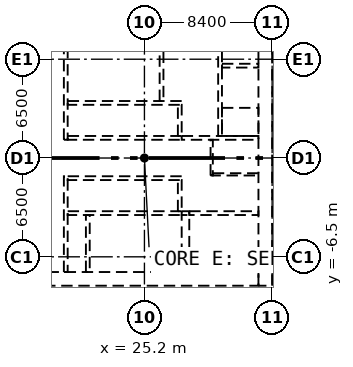
"""IFC4 building model, lengths in metres.
Left out: names, types, materials, properties, quantities, classifications, styles, units other than length and angle.
Written with IfcOpenShell. Run it as: python <this file> out.ifc"""

import sys

from ifc_helpers import new_model, si_unit, direction, frame, frame_2d, origin, place, context, subcontext, project, spatial, rectangle, extrude, element, fill, save


model = new_model("IFC4")
c1 = context("Model", 3, precision=1e-05, world=origin(), true_north=direction((0.0, 1.0)))
c2 = subcontext(c1, "Body", "Model", "MODEL_VIEW")
j1 = project(units=[si_unit("LENGTHUNIT", "METRE"), si_unit("PLANEANGLEUNIT", "RADIAN")], contexts=[c1])
p1 = place(None, origin())
s1 = spatial("IfcSite", under=j1, at=p1, CompositionType="ELEMENT")
p2 = place(p1, origin())
s2 = spatial("IfcBuilding", under=s1, at=p2, CompositionType="ELEMENT")
p3 = place(p2, origin())
s3 = spatial("IfcBuildingStorey", under=s2, at=p3, CompositionType="ELEMENT", Elevation=0.0)
p4 = place(p3, frame((33.15, -8.4, 0.0), z_axis=(0.0, 0.0, 1.0), x_axis=(0.0, 1.0, 0.0)))
e1 = element("IfcWall", 1, at=p4, inside=s3, PredefinedType="SHEAR", context=c2, shape_type="SweptSolid", body=[
    extrude(rectangle(XDim=16.8, YDim=0.9, at=frame_2d((8.4, 0.0))), origin(), (0.0, 0.0, 1.0), 8.6),
])
p5 = place(p3, frame((17.7, -7.95, 0.0), z_axis=(0.0, 0.0, 1.0), x_axis=(1.0, 0.0, 0.0)))
e2 = element("IfcWall", 2, at=p5, inside=s3, PredefinedType="SHEAR", context=c2, shape_type="SweptSolid", body=[
    extrude(rectangle(XDim=15.0, YDim=0.9, at=frame_2d((7.5, 0.0))), origin(), (0.0, 0.0, 1.0), 8.6),
])
p6 = place(p5, frame((2.55, 0.0, 0.0)))
e3 = element("IfcOpeningElement", 3, at=p6, cuts=e2, PredefinedType="OPENING", context=c2, shape_type="SweptSolid", body=[
    extrude(rectangle(XDim=1.0, YDim=2.1, at=frame_2d((0.5, 1.05))), frame((0.0, 0.46, 0.0), z_axis=(0.0, -1.0, 0.0), x_axis=(1.0, 0.0, 0.0)), (0.0, 0.0, 1.0), 0.92),
])
p7 = place(p5, frame((4.2, 0.0, 0.0)))
e4 = element("IfcOpeningElement", 4, at=p7, cuts=e2, PredefinedType="OPENING", context=c2, shape_type="SweptSolid", body=[
    extrude(rectangle(XDim=1.2, YDim=2.1, at=frame_2d((0.6, 1.05))), frame((0.0, 0.46, 0.0), z_axis=(0.0, -1.0, 0.0), x_axis=(1.0, 0.0, 0.0)), (0.0, 0.0, 1.0), 0.92),
])
p8 = place(p3, frame((20.025, 1.2, 0.0), z_axis=(0.0, 0.0, 1.0), x_axis=(0.0, 1.0, 0.0)))
e5 = element("IfcWall", 5, at=p8, inside=s3, PredefinedType="SHEAR", context=c2, shape_type="SweptSolid", body=[
    extrude(rectangle(XDim=6.3, YDim=0.25, at=frame_2d((3.15, 0.0))), origin(), (0.0, 0.0, 1.0), 8.6),
])
p9 = place(p3, frame((20.025, -7.5, 0.0), z_axis=(0.0, 0.0, 1.0), x_axis=(0.0, 1.0, 0.0)))
e6 = element("IfcWall", 6, at=p9, inside=s3, PredefinedType="SHEAR", context=c2, shape_type="SweptSolid", body=[
    extrude(rectangle(XDim=6.3, YDim=0.25, at=frame_2d((3.15, 0.0))), origin(), (0.0, 0.0, 1.0), 8.6),
])
p10 = place(p9, frame((2.4, 0.0, 0.0)))
e7 = element("IfcOpeningElement", 7, at=p10, cuts=e6, PredefinedType="OPENING", context=c2, shape_type="SweptSolid", body=[
    extrude(rectangle(XDim=1.0, YDim=2.1, at=frame_2d((0.5, 1.05))), frame((0.0, 0.135, 0.0), z_axis=(0.0, -1.0, 0.0), x_axis=(1.0, 0.0, 0.0)), (0.0, 0.0, 1.0), 0.27),
])
p11 = place(p3, frame((20.15, 1.325, 0.0), z_axis=(0.0, 0.0, 1.0), x_axis=(1.0, 0.0, 0.0)))
e8 = element("IfcWall", 8, at=p11, inside=s3, PredefinedType="SHEAR", context=c2, shape_type="SweptSolid", body=[
    extrude(rectangle(XDim=7.5, YDim=0.25, at=frame_2d((3.75, 0.0))), origin(), (0.0, 0.0, 1.0), 8.6),
])
p12 = place(p11, frame((0.65, 0.0, 0.0)))
e9 = element("IfcOpeningElement", 9, at=p12, cuts=e8, PredefinedType="OPENING", context=c2, shape_type="SweptSolid", body=[
    extrude(rectangle(XDim=1.1, YDim=2.1, at=frame_2d((0.55, 1.05))), frame((0.0, 0.135, 0.0), z_axis=(0.0, -1.0, 0.0), x_axis=(1.0, 0.0, 0.0)), (0.0, 0.0, 1.0), 0.27),
])
p13 = place(p11, frame((3.05, 0.0, 0.0)))
e10 = element("IfcOpeningElement", 10, at=p13, cuts=e8, PredefinedType="OPENING", context=c2, shape_type="SweptSolid", body=[
    extrude(rectangle(XDim=1.1, YDim=2.1, at=frame_2d((0.55, 1.05))), frame((0.0, 0.135, 0.0), z_axis=(0.0, -1.0, 0.0), x_axis=(1.0, 0.0, 0.0)), (0.0, 0.0, 1.0), 0.27),
])
p14 = place(p11, frame((5.45, 0.0, 0.0)))
e11 = element("IfcOpeningElement", 11, at=p14, cuts=e8, PredefinedType="OPENING", context=c2, shape_type="SweptSolid", body=[
    extrude(rectangle(XDim=1.1, YDim=2.1, at=frame_2d((0.55, 1.05))), frame((0.0, 0.135, 0.0), z_axis=(0.0, -1.0, 0.0), x_axis=(1.0, 0.0, 0.0)), (0.0, 0.0, 1.0), 0.27),
])
p15 = place(p3, frame((27.525, 1.45, 0.0), z_axis=(0.0, 0.0, 1.0), x_axis=(0.0, 1.0, 0.0)))
e12 = element("IfcWall", 12, at=p15, inside=s3, PredefinedType="SHEAR", context=c2, shape_type="SweptSolid", body=[
    extrude(rectangle(XDim=2.05, YDim=0.25, at=frame_2d((1.025, 0.0))), origin(), (0.0, 0.0, 1.0), 8.6),
])
p16 = place(p3, frame((20.15, 3.625, 0.0), z_axis=(0.0, 0.0, 1.0), x_axis=(1.0, 0.0, 0.0)))
e13 = element("IfcWall", 13, at=p16, inside=s3, PredefinedType="SHEAR", context=c2, shape_type="SweptSolid", body=[
    extrude(rectangle(XDim=7.5, YDim=0.25, at=frame_2d((3.75, 0.0))), origin(), (0.0, 0.0, 1.0), 8.6),
])
p17 = place(p3, frame((26.325, 3.75, 0.0), z_axis=(0.0, 0.0, 1.0), x_axis=(0.0, 1.0, 0.0)))
e14 = element("IfcWall", 14, at=p17, inside=s3, PredefinedType="SHEAR", context=c2, shape_type="SweptSolid", body=[
    extrude(rectangle(XDim=3.75, YDim=0.25, at=frame_2d((1.875, 0.0))), origin(), (0.0, 0.0, 1.0), 8.6),
])
p18 = place(p17, frame((1.25, 0.0, 0.0)))
e15 = element("IfcOpeningElement", 15, at=p18, cuts=e14, PredefinedType="OPENING", context=c2, shape_type="SweptSolid", body=[
    extrude(rectangle(XDim=1.2, YDim=2.1, at=frame_2d((0.6, 1.05))), frame((0.0, 0.135, 0.0), z_axis=(0.0, -1.0, 0.0), x_axis=(1.0, 0.0, 0.0)), (0.0, 0.0, 1.0), 0.27),
])
p19 = place(p3, frame((27.65, 1.325, 0.0), z_axis=(0.0, 0.0, 1.0), x_axis=(1.0, 0.0, 0.0)))
e16 = element("IfcWall", 16, at=p19, inside=s3, PredefinedType="SHEAR", context=c2, shape_type="SweptSolid", body=[
    extrude(rectangle(XDim=5.05, YDim=0.25, at=frame_2d((2.525, 0.0))), origin(), (0.0, 0.0, 1.0), 8.6),
])
p20 = place(p19, frame((0.55, 0.0, 0.0)))
e17 = element("IfcOpeningElement", 17, at=p20, cuts=e16, PredefinedType="OPENING", context=c2, shape_type="SweptSolid", body=[
    extrude(rectangle(XDim=1.2, YDim=2.1, at=frame_2d((0.6, 1.05))), frame((0.0, 0.135, 0.0), z_axis=(0.0, -1.0, 0.0), x_axis=(1.0, 0.0, 0.0)), (0.0, 0.0, 1.0), 0.27),
])
p21 = place(p3, frame((30.175, 1.45, 0.0), z_axis=(0.0, 0.0, 1.0), x_axis=(0.0, 1.0, 0.0)))
e18 = element("IfcWall", 18, at=p21, inside=s3, PredefinedType="SHEAR", context=c2, shape_type="SweptSolid", body=[
    extrude(rectangle(XDim=6.05, YDim=0.25, at=frame_2d((3.025, 0.0))), origin(), (0.0, 0.0, 1.0), 8.6),
])
p22 = place(p21, frame((2.625, 0.0, 0.0)))
e19 = element("IfcOpeningElement", 19, at=p22, cuts=e18, PredefinedType="OPENING", context=c2, shape_type="SweptSolid", body=[
    extrude(rectangle(XDim=1.1, YDim=2.1, at=frame_2d((0.55, 1.05))), frame((0.0, 0.135, 0.0), z_axis=(0.0, -1.0, 0.0), x_axis=(1.0, 0.0, 0.0)), (0.0, 0.0, 1.0), 0.27),
])
p23 = place(p3, frame((30.3, 2.375, 0.0), z_axis=(0.0, 0.0, 1.0), x_axis=(1.0, 0.0, 0.0)))
e20 = element("IfcWall", 20, at=p23, inside=s3, PredefinedType="SHEAR", context=c2, shape_type="SweptSolid", body=[
    extrude(rectangle(XDim=2.4, YDim=1.85, at=frame_2d((1.2, 0.0))), origin(), (0.0, 0.0, 1.0), 8.6),
])
p24 = place(p3, frame((30.3, 6.075, 0.0), z_axis=(0.0, 0.0, 1.0), x_axis=(1.0, 0.0, 0.0)))
e21 = element("IfcWall", 21, at=p24, inside=s3, PredefinedType="SHEAR", context=c2, shape_type="SweptSolid", body=[
    extrude(rectangle(XDim=2.4, YDim=0.25, at=frame_2d((1.2, 0.0))), origin(), (0.0, 0.0, 1.0), 8.6),
])
p25 = place(p3, frame((20.15, -1.325, 0.0), z_axis=(0.0, 0.0, 1.0), x_axis=(1.0, 0.0, 0.0)))
e22 = element("IfcWall", 22, at=p25, inside=s3, PredefinedType="SHEAR", context=c2, shape_type="SweptSolid", body=[
    extrude(rectangle(XDim=7.5, YDim=0.25, at=frame_2d((3.75, 0.0))), origin(), (0.0, 0.0, 1.0), 8.6),
])
p26 = place(p25, frame((0.65, 0.0, 0.0)))
e23 = element("IfcOpeningElement", 23, at=p26, cuts=e22, PredefinedType="OPENING", context=c2, shape_type="SweptSolid", body=[
    extrude(rectangle(XDim=1.1, YDim=2.1, at=frame_2d((0.55, 1.05))), frame((0.0, 0.135, 0.0), z_axis=(0.0, -1.0, 0.0), x_axis=(1.0, 0.0, 0.0)), (0.0, 0.0, 1.0), 0.27),
])
p27 = place(p25, frame((3.05, 0.0, 0.0)))
e24 = element("IfcOpeningElement", 24, at=p27, cuts=e22, PredefinedType="OPENING", context=c2, shape_type="SweptSolid", body=[
    extrude(rectangle(XDim=1.1, YDim=2.1, at=frame_2d((0.55, 1.05))), frame((0.0, 0.135, 0.0), z_axis=(0.0, -1.0, 0.0), x_axis=(1.0, 0.0, 0.0)), (0.0, 0.0, 1.0), 0.27),
])
p28 = place(p25, frame((5.45, 0.0, 0.0)))
e25 = element("IfcOpeningElement", 25, at=p28, cuts=e22, PredefinedType="OPENING", context=c2, shape_type="SweptSolid", body=[
    extrude(rectangle(XDim=1.1, YDim=2.1, at=frame_2d((0.55, 1.05))), frame((0.0, 0.135, 0.0), z_axis=(0.0, -1.0, 0.0), x_axis=(1.0, 0.0, 0.0)), (0.0, 0.0, 1.0), 0.27),
])
p29 = place(p3, frame((27.525, -3.5, 0.0), z_axis=(0.0, 0.0, 1.0), x_axis=(0.0, 1.0, 0.0)))
e26 = element("IfcWall", 26, at=p29, inside=s3, PredefinedType="SHEAR", context=c2, shape_type="SweptSolid", body=[
    extrude(rectangle(XDim=2.05, YDim=0.25, at=frame_2d((1.025, 0.0))), origin(), (0.0, 0.0, 1.0), 8.6),
])
p30 = place(p3, frame((20.15, -3.625, 0.0), z_axis=(0.0, 0.0, 1.0), x_axis=(1.0, 0.0, 0.0)))
e27 = element("IfcWall", 27, at=p30, inside=s3, PredefinedType="SHEAR", context=c2, shape_type="SweptSolid", body=[
    extrude(rectangle(XDim=7.5, YDim=0.25, at=frame_2d((3.75, 0.0))), origin(), (0.0, 0.0, 1.0), 8.6),
])
p31 = place(p3, frame((21.475, -7.5, 0.0), z_axis=(0.0, 0.0, 1.0), x_axis=(0.0, 1.0, 0.0)))
e28 = element("IfcWall", 28, at=p31, inside=s3, PredefinedType="SHEAR", context=c2, shape_type="SweptSolid", body=[
    extrude(rectangle(XDim=3.75, YDim=0.25, at=frame_2d((1.875, 0.0))), origin(), (0.0, 0.0, 1.0), 8.6),
])
p32 = place(p31, frame((1.3, 0.0, 0.0)))
e29 = element("IfcOpeningElement", 29, at=p32, cuts=e28, PredefinedType="OPENING", context=c2, shape_type="SweptSolid", body=[
    extrude(rectangle(XDim=1.2, YDim=2.1, at=frame_2d((0.6, 1.05))), frame((0.0, 0.135, 0.0), z_axis=(0.0, -1.0, 0.0), x_axis=(1.0, 0.0, 0.0)), (0.0, 0.0, 1.0), 0.27),
])
p33 = place(p3, frame((27.9, -7.5, 0.0), z_axis=(0.0, 0.0, 1.0), x_axis=(0.0, 1.0, 0.0)))
e30 = element("IfcWall", 30, at=p33, inside=s3, PredefinedType="SHEAR", context=c2, shape_type="SweptSolid", body=[
    extrude(rectangle(XDim=3.75, YDim=0.5, at=frame_2d((1.875, 0.0))), origin(), (0.0, 0.0, 1.0), 8.6),
])
p34 = place(p3, frame((28.15, -3.625, 0.0), z_axis=(0.0, 0.0, 1.0), x_axis=(1.0, 0.0, 0.0)))
e31 = element("IfcWall", 31, at=p34, inside=s3, PredefinedType="SHEAR", context=c2, shape_type="SweptSolid", body=[
    extrude(rectangle(XDim=4.55, YDim=0.25, at=frame_2d((2.275, 0.0))), origin(), (0.0, 0.0, 1.0), 8.6),
])
p35 = place(p34, frame((0.6, 0.0, 0.0)))
e32 = element("IfcOpeningElement", 32, at=p35, cuts=e31, PredefinedType="OPENING", context=c2, shape_type="SweptSolid", body=[
    extrude(rectangle(XDim=1.1, YDim=2.1, at=frame_2d((0.55, 1.05))), frame((0.0, 0.135, 0.0), z_axis=(0.0, -1.0, 0.0), x_axis=(1.0, 0.0, 0.0)), (0.0, 0.0, 1.0), 0.27),
])
p36 = place(p34, frame((2.85, 0.0, 0.0)))
e33 = element("IfcOpeningElement", 33, at=p36, cuts=e31, PredefinedType="OPENING", context=c2, shape_type="SweptSolid", body=[
    extrude(rectangle(XDim=1.1, YDim=2.1, at=frame_2d((0.55, 1.05))), frame((0.0, 0.135, 0.0), z_axis=(0.0, -1.0, 0.0), x_axis=(1.0, 0.0, 0.0)), (0.0, 0.0, 1.0), 0.27),
])
p37 = place(p3, frame((28.15, -6.75, 0.0), z_axis=(0.0, 0.0, 1.0), x_axis=(1.0, 0.0, 0.0)))
e34 = element("IfcWall", 34, at=p37, inside=s3, PredefinedType="SHEAR", context=c2, shape_type="SweptSolid", body=[
    extrude(rectangle(XDim=4.55, YDim=1.5, at=frame_2d((2.275, 0.0))), origin(), (0.0, 0.0, 1.0), 8.6),
])
p38 = place(p3, frame((27.65, -3.625, 0.0), z_axis=(0.0, 0.0, 1.0), x_axis=(1.0, 0.0, 0.0)))
e35 = element("IfcWall", 35, at=p38, inside=s3, PredefinedType="SHEAR", context=c2, shape_type="SweptSolid", body=[
    extrude(rectangle(XDim=0.5, YDim=0.25, at=frame_2d((0.25, 0.0))), origin(), (0.0, 0.0, 1.0), 8.6),
])
p39 = place(p3, frame((29.625, -1.15, 0.0), z_axis=(0.0, 0.0, 1.0), x_axis=(0.0, 1.0, 0.0)))
e36 = element("IfcWall", 36, at=p39, inside=s3, PredefinedType="PARTITIONING", context=c2, shape_type="SweptSolid", body=[
    extrude(rectangle(XDim=2.35, YDim=0.15, at=frame_2d((1.175, 0.0))), origin(), (0.0, 0.0, 1.0), 8.6),
])
p40 = place(p39, frame((0.8, 0.0, 0.0)))
e37 = element("IfcOpeningElement", 37, at=p40, cuts=e36, PredefinedType="OPENING", context=c2, shape_type="SweptSolid", body=[
    extrude(rectangle(XDim=0.9, YDim=2.1, at=frame_2d((0.45, 1.05))), frame((0.0, 0.085, 0.0), z_axis=(0.0, -1.0, 0.0), x_axis=(1.0, 0.0, 0.0)), (0.0, 0.0, 1.0), 0.17),
])
p41 = place(p3, frame((29.7, -1.075, 0.0), z_axis=(0.0, 0.0, 1.0), x_axis=(1.0, 0.0, 0.0)))
e38 = element("IfcWall", 38, at=p41, inside=s3, PredefinedType="PARTITIONING", context=c2, shape_type="SweptSolid", body=[
    extrude(rectangle(XDim=3.0, YDim=0.15, at=frame_2d((1.5, 0.0))), origin(), (0.0, 0.0, 1.0), 8.6),
])
p42 = place(p3, frame((33.6, -8.4, 0.0), z_axis=(0.0, 0.0, 1.0), x_axis=(1.0, 0.0, 0.0)))
e39 = element("IfcWall", 39, at=p42, inside=s3, PredefinedType="PARTITIONING", context=c2, shape_type="SweptSolid", body=[
    extrude(rectangle(XDim=5.4, YDim=0.2, at=frame_2d((2.7, 0.0))), origin(), (0.0, 0.0, 1.0), 8.6),
])
p43 = place(p6, origin())
e40 = element("IfcDoor", 40, at=p43, inside=s3, OperationType="SINGLE_SWING_LEFT", PredefinedType="DOOR", context=c2, shape_type="SweptSolid", body=[
    extrude(rectangle(XDim=1.0, YDim=2.1, at=frame_2d((0.5, 1.05))), frame((0.0, 0.025, 0.0), z_axis=(0.0, -1.0, 0.0), x_axis=(1.0, 0.0, 0.0)), (0.0, 0.0, 1.0), 0.05),
])
fill(e3, e40)
p44 = place(p7, frame((1.2, 0.0, 0.0), z_axis=(0.0, 0.0, 1.0), x_axis=(-1.0, 0.0, 0.0)))
e41 = element("IfcDoor", 41, at=p44, inside=s3, OperationType="DOUBLE_DOOR_SINGLE_SWING", PredefinedType="DOOR", context=c2, shape_type="SweptSolid", body=[
    extrude(rectangle(XDim=1.2, YDim=2.1, at=frame_2d((0.6, 1.05))), frame((0.0, 0.025, 0.0), z_axis=(0.0, -1.0, 0.0), x_axis=(1.0, 0.0, 0.0)), (0.0, 0.0, 1.0), 0.05),
])
fill(e4, e41)
p45 = place(p18, origin())
e42 = element("IfcDoor", 42, at=p45, inside=s3, OperationType="DOUBLE_DOOR_SINGLE_SWING", PredefinedType="DOOR", context=c2, shape_type="SweptSolid", body=[
    extrude(rectangle(XDim=1.2, YDim=2.1, at=frame_2d((0.6, 1.05))), frame((0.0, 0.025, 0.0), z_axis=(0.0, -1.0, 0.0), x_axis=(1.0, 0.0, 0.0)), (0.0, 0.0, 1.0), 0.05),
])
fill(e15, e42)
p46 = place(p32, origin())
e43 = element("IfcDoor", 43, at=p46, inside=s3, OperationType="DOUBLE_DOOR_SINGLE_SWING", PredefinedType="DOOR", context=c2, shape_type="SweptSolid", body=[
    extrude(rectangle(XDim=1.2, YDim=2.1, at=frame_2d((0.6, 1.05))), frame((0.0, 0.025, 0.0), z_axis=(0.0, -1.0, 0.0), x_axis=(1.0, 0.0, 0.0)), (0.0, 0.0, 1.0), 0.05),
])
fill(e29, e43)
p47 = place(p10, origin())
e44 = element("IfcDoor", 44, at=p47, inside=s3, OperationType="SINGLE_SWING_RIGHT", PredefinedType="DOOR", context=c2, shape_type="SweptSolid", body=[
    extrude(rectangle(XDim=1.0, YDim=2.1, at=frame_2d((0.5, 1.05))), frame((0.0, 0.025, 0.0), z_axis=(0.0, -1.0, 0.0), x_axis=(1.0, 0.0, 0.0)), (0.0, 0.0, 1.0), 0.05),
])
fill(e7, e44)
p48 = place(p20, origin())
e45 = element("IfcDoor", 45, at=p48, inside=s3, OperationType="DOUBLE_DOOR_SINGLE_SWING", PredefinedType="DOOR", context=c2, shape_type="SweptSolid", body=[
    extrude(rectangle(XDim=1.2, YDim=2.1, at=frame_2d((0.6, 1.05))), frame((0.0, 0.025, 0.0), z_axis=(0.0, -1.0, 0.0), x_axis=(1.0, 0.0, 0.0)), (0.0, 0.0, 1.0), 0.05),
])
fill(e17, e45)
p49 = place(p40, origin())
e46 = element("IfcDoor", 46, at=p49, inside=s3, OperationType="SINGLE_SWING_RIGHT", PredefinedType="DOOR", context=c2, shape_type="SweptSolid", body=[
    extrude(rectangle(XDim=0.9, YDim=2.1, at=frame_2d((0.45, 1.05))), frame((0.0, 0.025, 0.0), z_axis=(0.0, -1.0, 0.0), x_axis=(1.0, 0.0, 0.0)), (0.0, 0.0, 1.0), 0.05),
])
fill(e37, e46)
p50 = place(p12, origin())
e47 = element("IfcDoor", 47, at=p50, inside=s3, OperationType="DOUBLE_DOOR_SLIDING", PredefinedType="DOOR", context=c2, shape_type="SweptSolid", body=[
    extrude(rectangle(XDim=1.1, YDim=2.1, at=frame_2d((0.55, 1.05))), frame((0.0, 0.025, 0.0), z_axis=(0.0, -1.0, 0.0), x_axis=(1.0, 0.0, 0.0)), (0.0, 0.0, 1.0), 0.05),
])
fill(e9, e47)
p51 = place(p13, origin())
e48 = element("IfcDoor", 48, at=p51, inside=s3, OperationType="DOUBLE_DOOR_SLIDING", PredefinedType="DOOR", context=c2, shape_type="SweptSolid", body=[
    extrude(rectangle(XDim=1.1, YDim=2.1, at=frame_2d((0.55, 1.05))), frame((0.0, 0.025, 0.0), z_axis=(0.0, -1.0, 0.0), x_axis=(1.0, 0.0, 0.0)), (0.0, 0.0, 1.0), 0.05),
])
fill(e10, e48)
p52 = place(p14, origin())
e49 = element("IfcDoor", 49, at=p52, inside=s3, OperationType="DOUBLE_DOOR_SLIDING", PredefinedType="DOOR", context=c2, shape_type="SweptSolid", body=[
    extrude(rectangle(XDim=1.1, YDim=2.1, at=frame_2d((0.55, 1.05))), frame((0.0, 0.025, 0.0), z_axis=(0.0, -1.0, 0.0), x_axis=(1.0, 0.0, 0.0)), (0.0, 0.0, 1.0), 0.05),
])
fill(e11, e49)
p53 = place(p26, origin())
e50 = element("IfcDoor", 50, at=p53, inside=s3, OperationType="DOUBLE_DOOR_SLIDING", PredefinedType="DOOR", context=c2, shape_type="SweptSolid", body=[
    extrude(rectangle(XDim=1.1, YDim=2.1, at=frame_2d((0.55, 1.05))), frame((0.0, 0.025, 0.0), z_axis=(0.0, -1.0, 0.0), x_axis=(1.0, 0.0, 0.0)), (0.0, 0.0, 1.0), 0.05),
])
fill(e23, e50)
p54 = place(p27, origin())
e51 = element("IfcDoor", 51, at=p54, inside=s3, OperationType="DOUBLE_DOOR_SLIDING", PredefinedType="DOOR", context=c2, shape_type="SweptSolid", body=[
    extrude(rectangle(XDim=1.1, YDim=2.1, at=frame_2d((0.55, 1.05))), frame((0.0, 0.025, 0.0), z_axis=(0.0, -1.0, 0.0), x_axis=(1.0, 0.0, 0.0)), (0.0, 0.0, 1.0), 0.05),
])
fill(e24, e51)
p55 = place(p28, origin())
e52 = element("IfcDoor", 52, at=p55, inside=s3, OperationType="DOUBLE_DOOR_SLIDING", PredefinedType="DOOR", context=c2, shape_type="SweptSolid", body=[
    extrude(rectangle(XDim=1.1, YDim=2.1, at=frame_2d((0.55, 1.05))), frame((0.0, 0.025, 0.0), z_axis=(0.0, -1.0, 0.0), x_axis=(1.0, 0.0, 0.0)), (0.0, 0.0, 1.0), 0.05),
])
fill(e25, e52)
p56 = place(p22, origin())
e53 = element("IfcDoor", 53, at=p56, inside=s3, OperationType="DOUBLE_DOOR_SLIDING", PredefinedType="DOOR", context=c2, shape_type="SweptSolid", body=[
    extrude(rectangle(XDim=1.1, YDim=2.1, at=frame_2d((0.55, 1.05))), frame((0.0, 0.025, 0.0), z_axis=(0.0, -1.0, 0.0), x_axis=(1.0, 0.0, 0.0)), (0.0, 0.0, 1.0), 0.05),
])
fill(e19, e53)
p57 = place(p35, origin())
e54 = element("IfcDoor", 54, at=p57, inside=s3, OperationType="DOUBLE_DOOR_SLIDING", PredefinedType="DOOR", context=c2, shape_type="SweptSolid", body=[
    extrude(rectangle(XDim=1.1, YDim=2.1, at=frame_2d((0.55, 1.05))), frame((0.0, 0.025, 0.0), z_axis=(0.0, -1.0, 0.0), x_axis=(1.0, 0.0, 0.0)), (0.0, 0.0, 1.0), 0.05),
])
fill(e32, e54)
p58 = place(p36, origin())
e55 = element("IfcDoor", 55, at=p58, inside=s3, OperationType="DOUBLE_DOOR_SLIDING", PredefinedType="DOOR", context=c2, shape_type="SweptSolid", body=[
    extrude(rectangle(XDim=1.1, YDim=2.1, at=frame_2d((0.55, 1.05))), frame((0.0, 0.025, 0.0), z_axis=(0.0, -1.0, 0.0), x_axis=(1.0, 0.0, 0.0)), (0.0, 0.0, 1.0), 0.05),
])
fill(e33, e55)
save(model, sys.argv[1])
